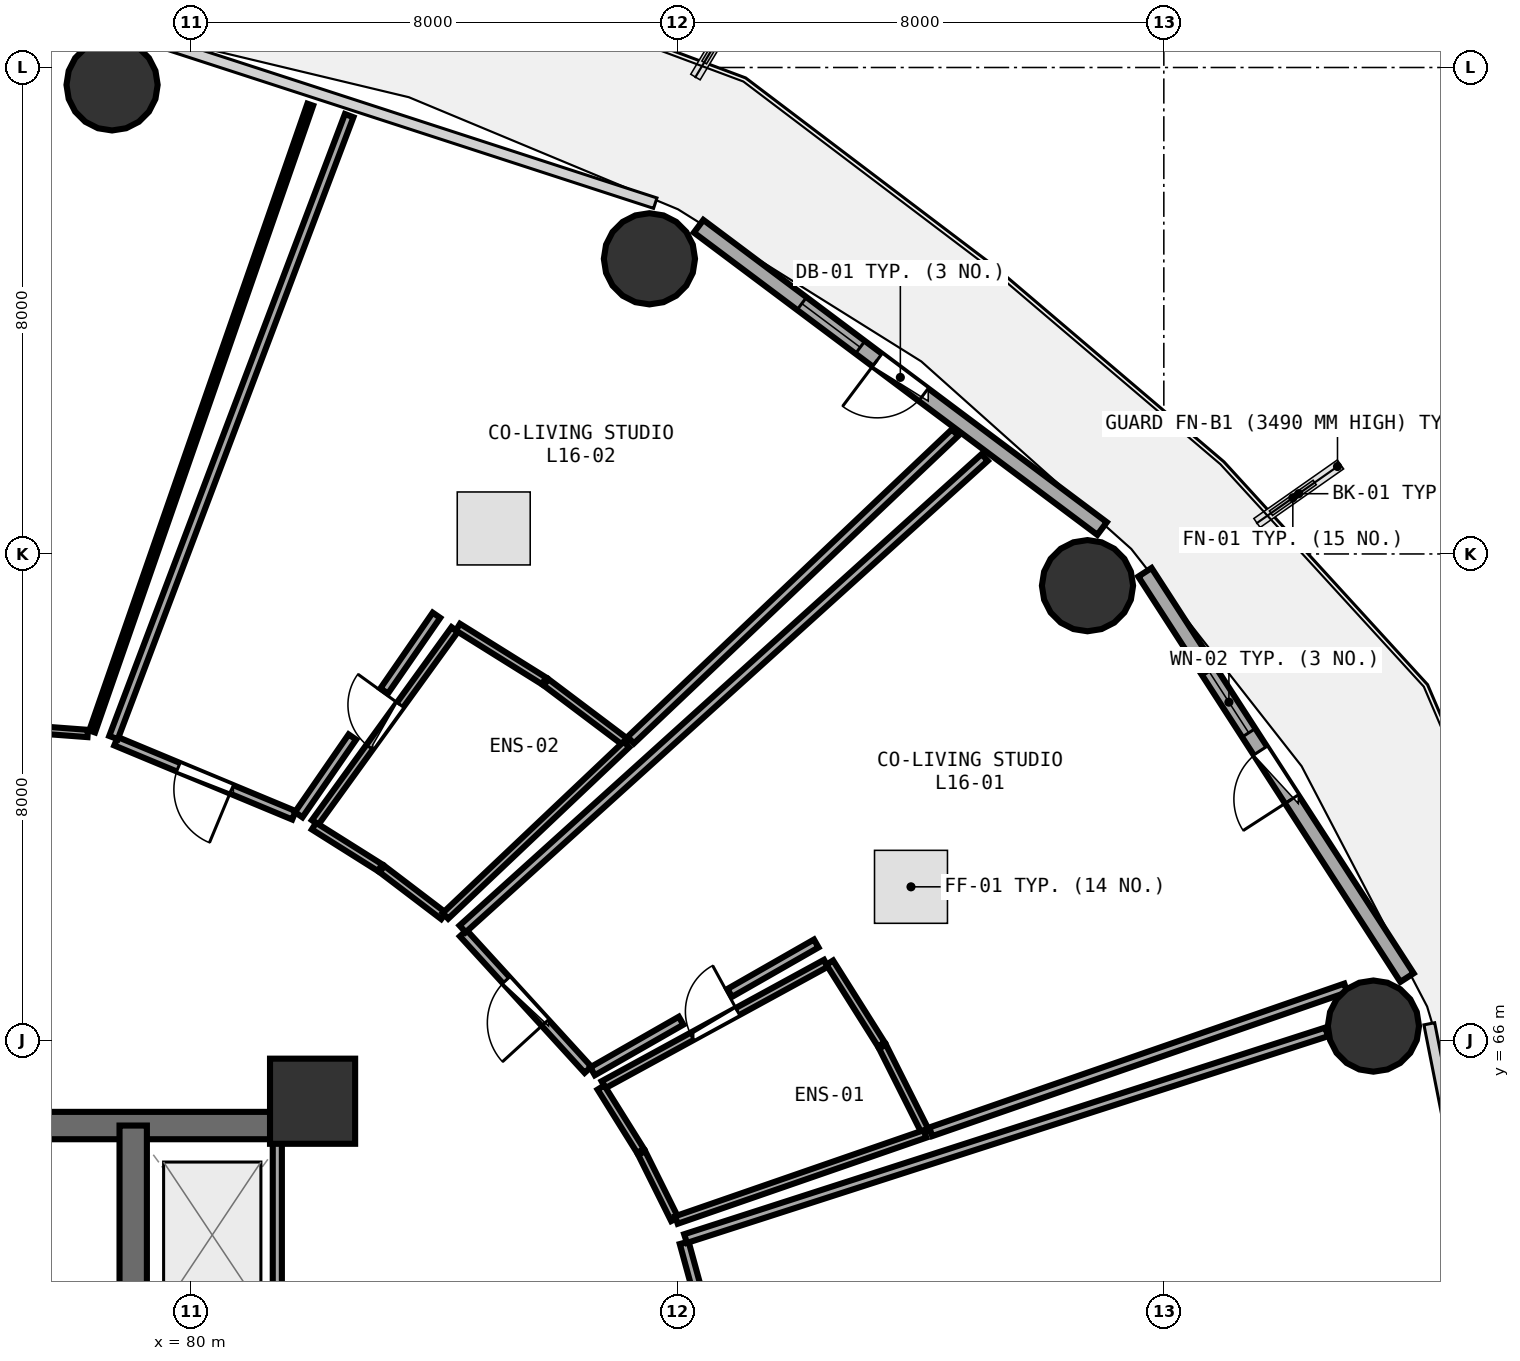
"""IFC4 building model, lengths in metres.
Left out: names, types, materials, properties, quantities, classifications, styles, units other than length and angle.
Written with IfcOpenShell. Run it as: python <this file> out.ifc"""

import sys

from ifc_helpers import new_model, si_unit, direction, frame, frame_2d, origin, origin_2d, place, context, subcontext, project, spatial, rectangle, circle, extrude, element, fill, save


model = new_model("IFC4")
c1 = context("Model", 3, precision=1e-05, world=origin(), true_north=direction((0.0, 1.0)))
c2 = subcontext(c1, "Body", "Model", "MODEL_VIEW")
j1 = project(units=[si_unit("LENGTHUNIT", "METRE"), si_unit("PLANEANGLEUNIT", "RADIAN")], contexts=[c1])
p1 = place(None, origin())
s1 = spatial("IfcSite", under=j1, at=p1, CompositionType="ELEMENT")
p2 = place(p1, origin())
s2 = spatial("IfcBuilding", under=s1, at=p2, CompositionType="ELEMENT")
p3 = place(p2, frame((0.0, 0.0, 63.75)))
s3 = spatial("IfcBuildingStorey", under=s2, at=p3, CompositionType="ELEMENT", Elevation=63.75)
p4 = place(p3, frame((82.0, 65.0, 0.0), z_axis=(0.0, 0.0, 1.0), x_axis=(1.0, 0.0, 0.0)))
e1 = element("IfcColumn", 1, at=p4, inside=s3, PredefinedType="PILASTER", context=c2, shape_type="SweptSolid", body=[
    extrude(rectangle(XDim=1.4, YDim=1.4, at=origin_2d()), origin(), (0.0, 0.0, 1.0), 3.75),
])
for number, where, z_axis, x_axis in (
    (2, (99.447, 66.236, 0.0), (0.0, 0.0, 1.0), (1.0, 0.0, 0.0)),
    (3, (94.744, 73.478, 0.0), (0.0, 0.0, 1.0), (1.0, 0.0, 0.0)),
    (4, (87.54, 78.854, 0.0), (0.0, 0.0, 1.0), (1.0, 0.0, 0.0)),
    (5, (78.702, 81.714, 0.0), (0.0, 0.0, 1.0), (1.0, 0.0, 0.0)),
):
    element("IfcColumn", number, at=place(p3, frame(where, z_axis=z_axis, x_axis=x_axis)), inside=s3, PredefinedType="COLUMN", context=c2, shape_type="SweptSolid", body=[
        extrude(circle(Radius=0.75, at=origin_2d()), origin(), (0.0, 0.0, 1.0), 3.75),
    ])
p5 = place(p3, frame((99.999, 67.033, 0.0), z_axis=(0.0, 0.0, 1.0), x_axis=(-0.543005114258, 0.839729388488, 0.0)))
e6 = element("IfcWall", 6, at=p5, inside=s3, PredefinedType="SOLIDWALL", context=c2, shape_type="SweptSolid", body=[
    extrude(rectangle(XDim=7.938, YDim=0.26, at=frame_2d((3.969, 0.0))), origin(), (0.0, 0.0, 1.0), 3.475),
])
p6 = place(p5, frame((3.494, 0.0, 0.0)))
e7 = element("IfcOpeningElement", 7, at=p6, cuts=e6, PredefinedType="OPENING", context=c2, shape_type="SweptSolid", body=[
    extrude(rectangle(XDim=0.95, YDim=2.1, at=frame_2d((0.475, 1.05))), frame((0.0, 0.14, 0.0), z_axis=(0.0, -1.0, 0.0), x_axis=(1.0, 0.0, 0.0)), (0.0, 0.0, 1.0), 0.28),
])
p7 = place(p5, frame((4.794, 0.0, 0.85)))
e8 = element("IfcOpeningElement", 8, at=p7, cuts=e6, PredefinedType="OPENING", context=c2, shape_type="SweptSolid", body=[
    extrude(rectangle(XDim=1.2, YDim=1.45, at=frame_2d((0.6, 0.725))), frame((0.0, 0.14, 0.0), z_axis=(0.0, -1.0, 0.0), x_axis=(1.0, 0.0, 0.0)), (0.0, 0.0, 1.0), 0.28),
])
p8 = place(p3, frame((94.984, 74.418, 0.0), z_axis=(0.0, 0.0, 1.0), x_axis=(-0.80030733173, 0.599590005569, 0.0)))
e9 = element("IfcWall", 9, at=p8, inside=s3, PredefinedType="SOLIDWALL", context=c2, shape_type="SweptSolid", body=[
    extrude(rectangle(XDim=8.291, YDim=0.26, at=frame_2d((4.145, 0.0))), origin(), (0.0, 0.0, 1.0), 3.475),
])
p9 = place(p8, frame((3.67, 0.0, 0.0)))
e10 = element("IfcOpeningElement", 10, at=p9, cuts=e9, PredefinedType="OPENING", context=c2, shape_type="SweptSolid", body=[
    extrude(rectangle(XDim=0.95, YDim=2.1, at=frame_2d((0.475, 1.05))), frame((0.0, 0.14, 0.0), z_axis=(0.0, -1.0, 0.0), x_axis=(1.0, 0.0, 0.0)), (0.0, 0.0, 1.0), 0.28),
])
p10 = place(p8, frame((4.97, 0.0, 0.85)))
e11 = element("IfcOpeningElement", 11, at=p10, cuts=e9, PredefinedType="OPENING", context=c2, shape_type="SweptSolid", body=[
    extrude(rectangle(XDim=1.2, YDim=1.45, at=frame_2d((0.6, 0.725))), frame((0.0, 0.14, 0.0), z_axis=(0.0, -1.0, 0.0), x_axis=(1.0, 0.0, 0.0)), (0.0, 0.0, 1.0), 0.28),
])
p11 = place(p3, frame((74.0, 64.6, 0.0), z_axis=(0.0, 0.0, 1.0), x_axis=(1.0, 0.0, 0.0)))
e12 = element("IfcWall", 12, at=p11, inside=s3, PredefinedType="SHEAR", context=c2, shape_type="SweptSolid", body=[
    extrude(rectangle(XDim=8.0, YDim=0.45, at=frame_2d((4.0, 0.0))), origin(), (0.0, 0.0, 1.0), 3.49),
])
p12 = place(p3, frame((79.05, 58.3, 0.0), z_axis=(0.0, 0.0, 1.0), x_axis=(0.0, 1.0, 0.0)))
e13 = element("IfcWall", 13, at=p12, inside=s3, PredefinedType="SHEAR", context=c2, shape_type="SweptSolid", body=[
    extrude(rectangle(XDim=6.3, YDim=0.45, at=frame_2d((3.15, 0.0))), origin(), (0.0, 0.0, 1.0), 3.49),
])
p13 = place(p3, frame((81.42, 61.48, 0.0), z_axis=(0.0, 0.0, 1.0), x_axis=(0.0, 1.0, 0.0)))
e14 = element("IfcWall", 14, at=p13, inside=s3, PredefinedType="PARTITIONING", context=c2, shape_type="SweptSolid", body=[
    extrude(rectangle(XDim=2.84, YDim=0.15, at=frame_2d((1.42, 0.0))), origin(), (0.0, 0.0, 1.0), 3.48),
])
p14 = place(p3, frame((86.785, 65.272, 0.0), z_axis=(0.0, 0.0, 1.0), x_axis=(0.877747757983, 0.479123025283, 0.0)))
e15 = element("IfcWall", 15, at=p14, inside=s3, PredefinedType="PLUMBINGWALL", context=c2, shape_type="SweptSolid", body=[
    extrude(rectangle(XDim=4.167, YDim=0.13, at=frame_2d((2.083, 0.0))), origin(), (0.0, 0.0, 1.0), 2.875),
])
p15 = place(p14, frame((1.654, 0.0, 0.0)))
e16 = element("IfcOpeningElement", 16, at=p15, cuts=e15, PredefinedType="OPENING", context=c2, shape_type="SweptSolid", body=[
    extrude(rectangle(XDim=0.86, YDim=2.05, at=frame_2d((0.43, 1.025))), frame((0.0, 0.075, 0.0), z_axis=(0.0, -1.0, 0.0), x_axis=(1.0, 0.0, 0.0)), (0.0, 0.0, 1.0), 0.15),
])
p16 = place(p3, frame((86.53, 65.517, 0.0), z_axis=(0.0, 0.0, 1.0), x_axis=(-0.674433052632, 0.738336005839, 0.0)))
e17 = element("IfcWall", 17, at=p16, inside=s3, PredefinedType="PARTITIONING", context=c2, shape_type="SweptSolid", body=[
    extrude(rectangle(XDim=3.041, YDim=0.15, at=frame_2d((1.521, 0.0))), origin(), (0.0, 0.0, 1.0), 2.875),
])
p17 = place(p16, frame((1.046, 0.0, 0.0)))
e18 = element("IfcOpeningElement", 18, at=p17, cuts=e17, PredefinedType="OPENING", context=c2, shape_type="SweptSolid", body=[
    extrude(rectangle(XDim=0.95, YDim=2.08, at=frame_2d((0.475, 1.04))), frame((0.0, 0.085, 0.0), z_axis=(0.0, -1.0, 0.0), x_axis=(1.0, 0.0, 0.0)), (0.0, 0.0, 1.0), 0.17),
])
p18 = place(p3, frame((82.041, 69.583, 0.0), z_axis=(0.0, 0.0, 1.0), x_axis=(0.586113694769, 0.810228817559, 0.0)))
e19 = element("IfcWall", 19, at=p18, inside=s3, PredefinedType="PLUMBINGWALL", context=c2, shape_type="SweptSolid", body=[
    extrude(rectangle(XDim=3.918, YDim=0.13, at=frame_2d((1.959, 0.0))), origin(), (0.0, 0.0, 1.0), 3.235),
])
p19 = place(p18, frame((1.529, 0.0, 0.0)))
e20 = element("IfcOpeningElement", 20, at=p19, cuts=e19, PredefinedType="OPENING", context=c2, shape_type="SweptSolid", body=[
    extrude(rectangle(XDim=0.86, YDim=2.05, at=frame_2d((0.43, 1.025))), frame((0.0, 0.075, 0.0), z_axis=(0.0, -1.0, 0.0), x_axis=(1.0, 0.0, 0.0)), (0.0, 0.0, 1.0), 0.15),
])
p20 = place(p3, frame((81.694, 69.702, 0.0), z_axis=(0.0, 0.0, 1.0), x_axis=(-0.923245473314, 0.384210614124, 0.0)))
e21 = element("IfcWall", 21, at=p20, inside=s3, PredefinedType="PARTITIONING", context=c2, shape_type="SweptSolid", body=[
    extrude(rectangle(XDim=3.169, YDim=0.15, at=frame_2d((1.585, 0.0))), origin(), (0.0, 0.0, 1.0), 2.875),
])
p21 = place(p20, frame((1.11, 0.0, 0.0)))
e22 = element("IfcOpeningElement", 22, at=p21, cuts=e21, PredefinedType="OPENING", context=c2, shape_type="SweptSolid", body=[
    extrude(rectangle(XDim=0.95, YDim=2.08, at=frame_2d((0.475, 1.04))), frame((0.0, 0.085, 0.0), z_axis=(0.0, -1.0, 0.0), x_axis=(1.0, 0.0, 0.0)), (0.0, 0.0, 1.0), 0.17),
])
p22 = place(p3, frame((78.302, 71.048, 0.0), z_axis=(0.0, 0.0, 1.0), x_axis=(-0.997215128993, 0.074578726908, 0.0)))
e23 = element("IfcWall", 23, at=p22, inside=s3, PredefinedType="PARTITIONING", context=c2, shape_type="SweptSolid", body=[
    extrude(rectangle(XDim=6.207, YDim=0.12, at=frame_2d((3.104, 0.0))), origin(), (0.0, 0.0, 1.0), 3.235),
])
p23 = place(p22, frame((2.653, 0.0, 0.0)))
e24 = element("IfcOpeningElement", 24, at=p23, cuts=e23, PredefinedType="OPENING", context=c2, shape_type="SweptSolid", body=[
    extrude(rectangle(XDim=0.9, YDim=2.08, at=frame_2d((0.45, 1.04))), frame((0.0, 0.07, 0.0), z_axis=(0.0, -1.0, 0.0), x_axis=(1.0, 0.0, 0.0)), (0.0, 0.0, 1.0), 0.14),
])
p24 = place(p3, frame((88.884, 59.845, 0.0), z_axis=(0.0, 0.0, 1.0), x_axis=(-0.263653235341, 0.964617526014, 0.0)))
e25 = element("IfcWall", 25, at=p24, inside=s3, PredefinedType="PARTITIONING", context=c2, shape_type="SweptSolid", body=[
    extrude(rectangle(XDim=2.93, YDim=0.15, at=frame_2d((1.465, 0.0))), origin(), (0.0, 0.0, 1.0), 3.48),
])
p25 = place(p24, frame((0.99, 0.0, 0.0)))
e26 = element("IfcOpeningElement", 26, at=p25, cuts=e25, PredefinedType="OPENING", context=c2, shape_type="SweptSolid", body=[
    extrude(rectangle(XDim=0.95, YDim=2.08, at=frame_2d((0.475, 1.04))), frame((0.0, 0.085, 0.0), z_axis=(0.0, -1.0, 0.0), x_axis=(1.0, 0.0, 0.0)), (0.0, 0.0, 1.0), 0.17),
])
p26 = place(p3, frame((87.956, 63.058, 0.0), z_axis=(0.0, 0.0, 1.0), x_axis=(-0.445610682281, 0.895226853841, 0.0)))
e27 = element("IfcWall", 27, at=p26, inside=s3, PredefinedType="PLUMBINGWALL", context=c2, shape_type="SweptSolid", body=[
    extrude(rectangle(XDim=1.219, YDim=0.13, at=frame_2d((0.609, 0.0))), origin(), (0.0, 0.0, 1.0), 3.48),
])
p27 = place(p3, frame((87.393, 64.184, 0.0), z_axis=(0.0, 0.0, 1.0), x_axis=(-0.5296416079, 0.848221531901, 0.0)))
e28 = element("IfcWall", 28, at=p27, inside=s3, PredefinedType="PLUMBINGWALL", context=c2, shape_type="SweptSolid", body=[
    extrude(rectangle(XDim=1.229, YDim=0.13, at=frame_2d((0.614, 0.0))), origin(), (0.0, 0.0, 1.0), 2.875),
])
p28 = place(p3, frame((90.506, 67.28, 0.0), z_axis=(0.0, 0.0, 1.0), x_axis=(0.533000334155, -0.846115029881, 0.0)))
e29 = element("IfcWall", 29, at=p28, inside=s3, PredefinedType="PLUMBINGWALL", context=c2, shape_type="SweptSolid", body=[
    extrude(rectangle(XDim=1.592, YDim=0.13, at=frame_2d((0.796, 0.0))), origin(), (0.0, 0.0, 1.0), 3.48),
])
p29 = place(p3, frame((91.374, 65.898, 0.0), z_axis=(0.0, 0.0, 1.0), x_axis=(0.448882213202, -0.893590934752, 0.0)))
e30 = element("IfcWall", 30, at=p29, inside=s3, PredefinedType="PLUMBINGWALL", context=c2, shape_type="SweptSolid", body=[
    extrude(rectangle(XDim=1.579, YDim=0.13, at=frame_2d((0.79, 0.0))), origin(), (0.0, 0.0, 1.0), 2.875),
])
p30 = place(p3, frame((92.073, 64.462, 0.0), z_axis=(0.0, 0.0, 1.0), x_axis=(-0.944946491884, -0.327224888228, 0.0)))
e31 = element("IfcWall", 31, at=p30, inside=s3, PredefinedType="PLUMBINGWALL", context=c2, shape_type="SweptSolid", body=[
    extrude(rectangle(XDim=4.327, YDim=0.13, at=frame_2d((2.164, 0.0))), origin(), (0.0, 0.0, 1.0), 3.235),
])
p31 = place(p3, frame((84.468, 67.834, 0.0), z_axis=(0.0, 0.0, 1.0), x_axis=(0.742191353367, 0.670188029577, 0.0)))
e32 = element("IfcWall", 32, at=p31, inside=s3, PredefinedType="PARTITIONING", context=c2, shape_type="SweptSolid", body=[
    extrude(rectangle(XDim=11.569, YDim=0.15, at=frame_2d((5.785, 0.0))), origin(), (0.0, 0.0, 1.0), 2.875),
])
p32 = place(p3, frame((98.992, 66.864, 0.0), z_axis=(0.0, 0.0, 1.0), x_axis=(-0.944826855148, -0.327570166212, 0.0)))
e33 = element("IfcWall", 33, at=p32, inside=s3, PredefinedType="PARTITIONING", context=c2, shape_type="SweptSolid", body=[
    extrude(rectangle(XDim=7.224, YDim=0.15, at=frame_2d((3.612, 0.0))), origin(), (0.0, 0.0, 1.0), 2.875),
])
p33 = place(p3, frame((90.283, 67.594, 0.0), z_axis=(0.0, 0.0, 1.0), x_axis=(-0.868279787631, -0.496074803221, 0.0)))
e34 = element("IfcWall", 34, at=p33, inside=s3, PredefinedType="PARTITIONING", context=c2, shape_type="SweptSolid", body=[
    extrude(rectangle(XDim=1.64, YDim=0.15, at=frame_2d((0.82, 0.0))), origin(), (0.0, 0.0, 1.0), 3.48),
])
p34 = place(p3, frame((88.06, 66.324, 0.0), z_axis=(0.0, 0.0, 1.0), x_axis=(-0.86835963742, -0.495935016004, 0.0)))
e35 = element("IfcWall", 35, at=p34, inside=s3, PredefinedType="PARTITIONING", context=c2, shape_type="SweptSolid", body=[
    extrude(rectangle(XDim=1.676, YDim=0.15, at=frame_2d((0.838, 0.0))), origin(), (0.0, 0.0, 1.0), 2.875),
])
p35 = place(p3, frame((84.155, 68.047, 0.0), z_axis=(0.0, 0.0, 1.0), x_axis=(-0.795884944477, 0.605447896317, 0.0)))
e36 = element("IfcWall", 36, at=p35, inside=s3, PredefinedType="PLUMBINGWALL", context=c2, shape_type="SweptSolid", body=[
    extrude(rectangle(XDim=1.273, YDim=0.13, at=frame_2d((0.636, 0.0))), origin(), (0.0, 0.0, 1.0), 2.875),
])
p36 = place(p3, frame((83.109, 68.841, 0.0), z_axis=(0.0, 0.0, 1.0), x_axis=(-0.846337656307, 0.532646760544, 0.0)))
e37 = element("IfcWall", 37, at=p36, inside=s3, PredefinedType="PLUMBINGWALL", context=c2, shape_type="SweptSolid", body=[
    extrude(rectangle(XDim=1.283, YDim=0.13, at=frame_2d((0.642, 0.0))), origin(), (0.0, 0.0, 1.0), 3.48),
])
p37 = place(p3, frame((84.39, 72.796, 0.0), z_axis=(0.0, 0.0, 1.0), x_axis=(0.848326822388, -0.529472947766, 0.0)))
e38 = element("IfcWall", 38, at=p37, inside=s3, PredefinedType="PLUMBINGWALL", context=c2, shape_type="SweptSolid", body=[
    extrude(rectangle(XDim=1.669, YDim=0.13, at=frame_2d((0.834, 0.0))), origin(), (0.0, 0.0, 1.0), 2.875),
])
p38 = place(p3, frame((85.839, 71.89, 0.0), z_axis=(0.0, 0.0, 1.0), x_axis=(0.798688091321, -0.601745239102, 0.0)))
e39 = element("IfcWall", 39, at=p38, inside=s3, PredefinedType="PLUMBINGWALL", context=c2, shape_type="SweptSolid", body=[
    extrude(rectangle(XDim=1.655, YDim=0.13, at=frame_2d((0.828, 0.0))), origin(), (0.0, 0.0, 1.0), 3.48),
])
p39 = place(p3, frame((87.163, 70.868, 0.0), z_axis=(0.0, 0.0, 1.0), x_axis=(-0.726077844379, -0.687612509996, 0.0)))
e40 = element("IfcWall", 40, at=p39, inside=s3, PredefinedType="PLUMBINGWALL", context=c2, shape_type="SweptSolid", body=[
    extrude(rectangle(XDim=4.1, YDim=0.13, at=frame_2d((2.05, 0.0))), origin(), (0.0, 0.0, 1.0), 3.235),
])
p40 = place(p3, frame((78.726, 70.98, 0.0), z_axis=(0.0, 0.0, 1.0), x_axis=(0.354325845477, 0.935122021571, 0.0)))
e41 = element("IfcWall", 41, at=p40, inside=s3, PredefinedType="PARTITIONING", context=c2, shape_type="SweptSolid", body=[
    extrude(rectangle(XDim=10.938, YDim=0.15, at=frame_2d((5.469, 0.0))), origin(), (0.0, 0.0, 1.0), 2.875),
])
p41 = place(p3, frame((92.567, 75.997, 0.0), z_axis=(0.0, 0.0, 1.0), x_axis=(-0.725622707533, -0.688092789028, 0.0)))
e42 = element("IfcWall", 42, at=p41, inside=s3, PredefinedType="PARTITIONING", context=c2, shape_type="SweptSolid", body=[
    extrude(rectangle(XDim=7.351, YDim=0.15, at=frame_2d((3.675, 0.0))), origin(), (0.0, 0.0, 1.0), 2.875),
])
p42 = place(p3, frame((84.037, 72.992, 0.0), z_axis=(0.0, 0.0, 1.0), x_axis=(-0.568328597461, -0.822801680424, 0.0)))
e43 = element("IfcWall", 43, at=p42, inside=s3, PredefinedType="PARTITIONING", context=c2, shape_type="SweptSolid", body=[
    extrude(rectangle(XDim=1.513, YDim=0.15, at=frame_2d((0.756, 0.0))), origin(), (0.0, 0.0, 1.0), 3.48),
])
p43 = place(p3, frame((82.655, 70.99, 0.0), z_axis=(0.0, 0.0, 1.0), x_axis=(-0.568335150004, -0.822797154389, 0.0)))
e44 = element("IfcWall", 44, at=p43, inside=s3, PredefinedType="PARTITIONING", context=c2, shape_type="SweptSolid", body=[
    extrude(rectangle(XDim=1.553, YDim=0.15, at=frame_2d((0.777, 0.0))), origin(), (0.0, 0.0, 1.0), 3.235),
])
p44 = place(p3, frame((81.962, 81.388, 0.0), z_axis=(0.0, 0.0, 1.0), x_axis=(-0.328662915274, -0.944447292401, 0.0)))
e45 = element("IfcWall", 45, at=p44, inside=s3, PredefinedType="PARTITIONING", context=c2, shape_type="SweptSolid", body=[
    extrude(rectangle(XDim=10.914, YDim=0.1, at=frame_2d((5.457, 0.0))), origin(), (0.0, 0.0, 1.0), 2.875),
])
p45 = place(p3, frame((88.134, 62.741, 0.0), z_axis=(0.0, 0.0, 1.0), x_axis=(0.951774856366, 0.30679736438, 0.0)))
e46 = element("IfcWall", 46, at=p45, inside=s3, PredefinedType="PARTITIONING", context=c2, shape_type="SweptSolid", body=[
    extrude(rectangle(XDim=11.078, YDim=0.15, at=frame_2d((5.539, 0.0))), origin(), (0.0, 0.0, 1.0), 2.875),
])
p46 = place(p6, frame((0.95, 0.0, 0.0), z_axis=(0.0, 0.0, 1.0), x_axis=(-1.0, 0.0, 0.0)))
e47 = element("IfcDoor", 47, at=p46, inside=s3, OperationType="SINGLE_SWING_RIGHT", PredefinedType="DOOR", context=c2, shape_type="SweptSolid", body=[
    extrude(rectangle(XDim=0.95, YDim=2.1, at=frame_2d((0.475, 1.05))), frame((0.0, 0.025, 0.0), z_axis=(0.0, -1.0, 0.0), x_axis=(1.0, 0.0, 0.0)), (0.0, 0.0, 1.0), 0.05),
])
fill(e7, e47)
p47 = place(p7, origin())
e48 = element("IfcWindow", 48, at=p47, inside=s3, PartitioningType="SINGLE_PANEL", PredefinedType="WINDOW", context=c2, shape_type="SweptSolid", body=[
    extrude(rectangle(XDim=1.2, YDim=1.45, at=frame_2d((0.6, 0.725))), frame((0.0, 0.03, 0.0), z_axis=(0.0, -1.0, 0.0), x_axis=(1.0, 0.0, 0.0)), (0.0, 0.0, 1.0), 0.06),
])
fill(e8, e48)
p48 = place(p9, frame((0.95, 0.0, 0.0), z_axis=(0.0, 0.0, 1.0), x_axis=(-1.0, 0.0, 0.0)))
e49 = element("IfcDoor", 49, at=p48, inside=s3, OperationType="SINGLE_SWING_LEFT", PredefinedType="DOOR", context=c2, shape_type="SweptSolid", body=[
    extrude(rectangle(XDim=0.95, YDim=2.1, at=frame_2d((0.475, 1.05))), frame((0.0, 0.025, 0.0), z_axis=(0.0, -1.0, 0.0), x_axis=(1.0, 0.0, 0.0)), (0.0, 0.0, 1.0), 0.05),
])
fill(e10, e49)
p49 = place(p10, origin())
e50 = element("IfcWindow", 50, at=p49, inside=s3, PartitioningType="SINGLE_PANEL", PredefinedType="WINDOW", context=c2, shape_type="SweptSolid", body=[
    extrude(rectangle(XDim=1.2, YDim=1.45, at=frame_2d((0.6, 0.725))), frame((0.0, 0.03, 0.0), z_axis=(0.0, -1.0, 0.0), x_axis=(1.0, 0.0, 0.0)), (0.0, 0.0, 1.0), 0.06),
])
fill(e11, e50)
p50 = place(p15, origin())
e51 = element("IfcDoor", 51, at=p50, inside=s3, OperationType="SINGLE_SWING_RIGHT", PredefinedType="DOOR", context=c2, shape_type="SweptSolid", body=[
    extrude(rectangle(XDim=0.86, YDim=2.05, at=frame_2d((0.43, 1.025))), frame((0.0, 0.025, 0.0), z_axis=(0.0, -1.0, 0.0), x_axis=(1.0, 0.0, 0.0)), (0.0, 0.0, 1.0), 0.05),
])
fill(e16, e51)
p51 = place(p17, origin())
e52 = element("IfcDoor", 52, at=p51, inside=s3, OperationType="SINGLE_SWING_LEFT", PredefinedType="DOOR", context=c2, shape_type="SweptSolid", body=[
    extrude(rectangle(XDim=0.95, YDim=2.08, at=frame_2d((0.475, 1.04))), frame((0.0, 0.025, 0.0), z_axis=(0.0, -1.0, 0.0), x_axis=(1.0, 0.0, 0.0)), (0.0, 0.0, 1.0), 0.05),
])
fill(e18, e52)
p52 = place(p19, origin())
e53 = element("IfcDoor", 53, at=p52, inside=s3, OperationType="SINGLE_SWING_RIGHT", PredefinedType="DOOR", context=c2, shape_type="SweptSolid", body=[
    extrude(rectangle(XDim=0.86, YDim=2.05, at=frame_2d((0.43, 1.025))), frame((0.0, 0.025, 0.0), z_axis=(0.0, -1.0, 0.0), x_axis=(1.0, 0.0, 0.0)), (0.0, 0.0, 1.0), 0.05),
])
fill(e20, e53)
p53 = place(p21, origin())
e54 = element("IfcDoor", 54, at=p53, inside=s3, OperationType="SINGLE_SWING_LEFT", PredefinedType="DOOR", context=c2, shape_type="SweptSolid", body=[
    extrude(rectangle(XDim=0.95, YDim=2.08, at=frame_2d((0.475, 1.04))), frame((0.0, 0.025, 0.0), z_axis=(0.0, -1.0, 0.0), x_axis=(1.0, 0.0, 0.0)), (0.0, 0.0, 1.0), 0.05),
])
fill(e22, e54)
save(model, sys.argv[1])
